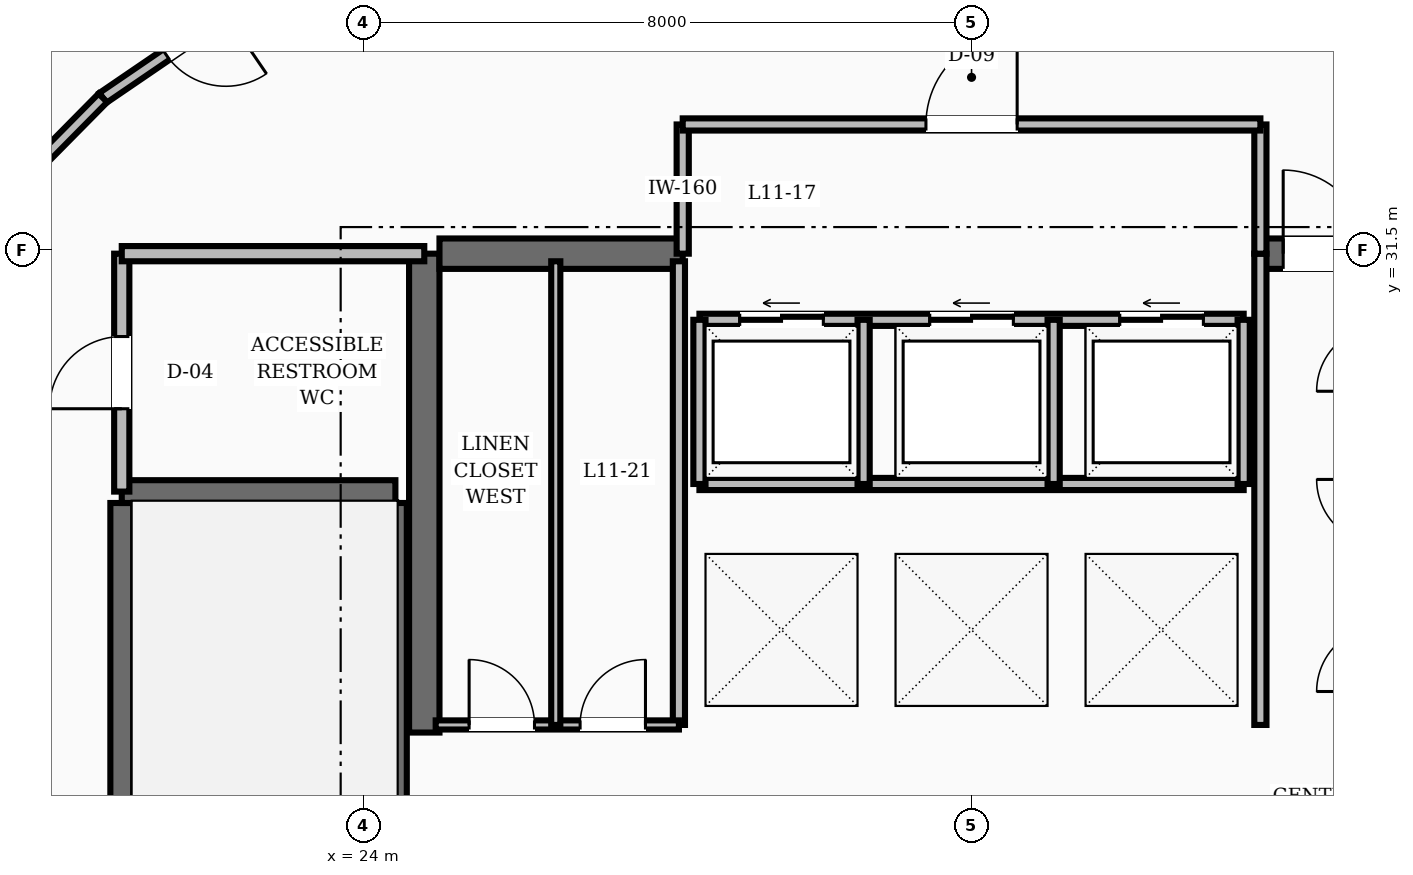
"""IFC4 building model, lengths in metres.
Left out: names, types, materials, properties, quantities, classifications, styles, units other than length and angle.
Written with IfcOpenShell. Run it as: python <this file> out.ifc"""

import sys

from ifc_helpers import new_model, si_unit, direction, frame, frame_2d, origin, place, context, subcontext, project, spatial, rectangle, extrude, element, fill, save


model = new_model("IFC4")
c1 = context("Model", 3, precision=1e-05, world=origin(), true_north=direction((0.0, 1.0)))
c2 = subcontext(c1, "Body", "Model", "MODEL_VIEW")
j1 = project(units=[si_unit("LENGTHUNIT", "METRE"), si_unit("PLANEANGLEUNIT", "RADIAN")], contexts=[c1])
p1 = place(None, origin())
s1 = spatial("IfcSite", under=j1, at=p1, CompositionType="ELEMENT")
p2 = place(p1, origin())
s2 = spatial("IfcBuilding", under=s1, at=p2, CompositionType="ELEMENT")
p3 = place(p2, frame((0.0, 0.0, 48.4)))
s3 = spatial("IfcBuildingStorey", under=s2, at=p3, CompositionType="ELEMENT", Elevation=48.4)
p4 = place(p3, frame((24.8, 25.15, 0.0), z_axis=(0.0, 0.0, 1.0), x_axis=(0.0, 1.0, 0.0)))
e1 = element("IfcWall", 1, at=p4, inside=s3, PredefinedType="SHEAR", context=c2, shape_type="SweptSolid", body=[
    extrude(rectangle(XDim=6.3, YDim=0.4, at=frame_2d((3.15, 0.0))), origin(), (0.0, 0.0, 1.0), 3.6),
])
p5 = place(p3, frame((25.0, 31.45, 0.0), z_axis=(0.0, 0.0, 1.0), x_axis=(1.0, 0.0, 0.0)))
e2 = element("IfcWall", 2, at=p5, inside=s3, PredefinedType="SHEAR", context=c2, shape_type="SweptSolid", body=[
    extrude(rectangle(XDim=3.2, YDim=0.4, at=frame_2d((1.6, 0.0))), origin(), (0.0, 0.0, 1.0), 3.6),
])
p6 = place(p3, frame((35.8, 31.45, 0.0), z_axis=(0.0, 0.0, 1.0), x_axis=(1.0, 0.0, 0.0)))
e3 = element("IfcWall", 3, at=p6, inside=s3, PredefinedType="SHEAR", context=c2, shape_type="SweptSolid", body=[
    extrude(rectangle(XDim=3.2, YDim=0.4, at=frame_2d((1.6, 0.0))), origin(), (0.0, 0.0, 1.0), 3.6),
])
p7 = place(p6, frame((0.3, 0.0, 0.0)))
e4 = element("IfcOpeningElement", 4, at=p7, cuts=e3, PredefinedType="OPENING", context=c2, shape_type="SweptSolid", body=[
    extrude(rectangle(XDim=1.1, YDim=2.1, at=frame_2d((0.55, 1.05))), frame((0.0, 0.21, 0.0), z_axis=(0.0, -1.0, 0.0), x_axis=(1.0, 0.0, 0.0)), (0.0, 0.0, 1.0), 0.42),
])
for number, where, z_axis, x_axis in (
    (5, (20.82, 19.43, 0.0), (0.0, 0.0, 1.0), (0.0, 1.0, 0.0)),
    (6, (24.42, 19.43, 0.0), (0.0, 0.0, 1.0), (0.0, 1.0, 0.0)),
):
    element("IfcWall", number, at=place(p3, frame(where, z_axis=z_axis, x_axis=x_axis)), inside=s3, PredefinedType="SHEAR", context=c2, shape_type="SweptSolid", body=[
        extrude(rectangle(XDim=8.74, YDim=0.3, at=frame_2d((4.37, 0.0))), origin(), (0.0, 0.0, 1.0), 3.6),
    ])
p8 = place(p3, frame((20.82, 28.32, 0.0), z_axis=(0.0, 0.0, 1.0), x_axis=(1.0, 0.0, 0.0)))
e7 = element("IfcWall", 7, at=p8, inside=s3, PredefinedType="SHEAR", context=c2, shape_type="SweptSolid", body=[
    extrude(rectangle(XDim=3.6, YDim=0.3, at=frame_2d((1.8, 0.0))), origin(), (0.0, 0.0, 1.0), 3.6),
])
p9 = place(p3, frame((20.82, 28.32, 0.0), z_axis=(0.0, 0.0, 1.0), x_axis=(0.0, 1.0, 0.0)))
e8 = element("IfcWall", 8, at=p9, inside=s3, PredefinedType="SOLIDWALL", context=c2, shape_type="SweptSolid", body=[
    extrude(rectangle(XDim=3.13, YDim=0.2, at=frame_2d((1.565, 0.0))), origin(), (0.0, 0.0, 1.0), 2.61),
])
p10 = place(p9, frame((1.09, 0.0, 0.0)))
e9 = element("IfcOpeningElement", 9, at=p10, cuts=e8, PredefinedType="OPENING", context=c2, shape_type="SweptSolid", body=[
    extrude(rectangle(XDim=0.95, YDim=2.1, at=frame_2d((0.475, 1.05))), frame((0.0, 0.11, 0.0), z_axis=(0.0, -1.0, 0.0), x_axis=(1.0, 0.0, 0.0)), (0.0, 0.0, 1.0), 0.22),
])
p11 = place(p3, frame((20.82, 31.45, 0.0), z_axis=(0.0, 0.0, 1.0), x_axis=(1.0, 0.0, 0.0)))
e10 = element("IfcWall", 10, at=p11, inside=s3, PredefinedType="SOLIDWALL", context=c2, shape_type="SweptSolid", body=[
    extrude(rectangle(XDim=3.98, YDim=0.2, at=frame_2d((1.99, 0.0))), origin(), (0.0, 0.0, 1.0), 2.61),
])
p12 = place(p3, frame((35.8, 25.25, 0.0), z_axis=(0.0, 0.0, 1.0), x_axis=(0.0, 1.0, 0.0)))
e11 = element("IfcWall", 11, at=p12, inside=s3, PredefinedType="SOLIDWALL", context=c2, shape_type="SweptSolid", body=[
    extrude(rectangle(XDim=6.2, YDim=0.16, at=frame_2d((3.1, 0.0))), origin(), (0.0, 0.0, 1.0), 2.61),
])
p13 = place(p3, frame((28.42, 30.58, 0.0), z_axis=(0.0, 0.0, 1.0), x_axis=(1.0, 0.0, 0.0)))
e12 = element("IfcWall", 12, at=p13, inside=s3, PredefinedType="SOLIDWALL", context=c2, shape_type="SweptSolid", body=[
    extrude(rectangle(XDim=7.16, YDim=0.16, at=frame_2d((3.58, 0.0))), origin(), (0.0, 0.0, 1.0), 2.61),
])
p14 = place(p13, frame((0.53, 0.0, 0.0)))
e13 = element("IfcOpeningElement", 13, at=p14, cuts=e12, PredefinedType="OPENING", context=c2, shape_type="SweptSolid", body=[
    extrude(rectangle(XDim=1.1, YDim=2.15, at=frame_2d((0.55, 1.075))), frame((0.0, 0.09, 0.0), z_axis=(0.0, -1.0, 0.0), x_axis=(1.0, 0.0, 0.0)), (0.0, 0.0, 1.0), 0.18),
])
p15 = place(p13, frame((3.03, 0.0, 0.0)))
e14 = element("IfcOpeningElement", 14, at=p15, cuts=e12, PredefinedType="OPENING", context=c2, shape_type="SweptSolid", body=[
    extrude(rectangle(XDim=1.1, YDim=2.15, at=frame_2d((0.55, 1.075))), frame((0.0, 0.09, 0.0), z_axis=(0.0, -1.0, 0.0), x_axis=(1.0, 0.0, 0.0)), (0.0, 0.0, 1.0), 0.18),
])
p16 = place(p13, frame((5.53, 0.0, 0.0)))
e15 = element("IfcOpeningElement", 15, at=p16, cuts=e12, PredefinedType="OPENING", context=c2, shape_type="SweptSolid", body=[
    extrude(rectangle(XDim=1.1, YDim=2.15, at=frame_2d((0.55, 1.075))), frame((0.0, 0.09, 0.0), z_axis=(0.0, -1.0, 0.0), x_axis=(1.0, 0.0, 0.0)), (0.0, 0.0, 1.0), 0.18),
])
p17 = place(p3, frame((28.42, 28.42, 0.0), z_axis=(0.0, 0.0, 1.0), x_axis=(1.0, 0.0, 0.0)))
e16 = element("IfcWall", 16, at=p17, inside=s3, PredefinedType="SOLIDWALL", context=c2, shape_type="SweptSolid", body=[
    extrude(rectangle(XDim=7.16, YDim=0.16, at=frame_2d((3.58, 0.0))), origin(), (0.0, 0.0, 1.0), 2.61),
])
for number, where, z_axis, x_axis in (
    (17, (28.42, 28.42, 0.0), (0.0, 0.0, 1.0), (0.0, 1.0, 0.0)),
    (18, (30.58, 28.42, 0.0), (0.0, 0.0, 1.0), (0.0, 1.0, 0.0)),
    (19, (33.08, 28.42, 0.0), (0.0, 0.0, 1.0), (0.0, 1.0, 0.0)),
    (20, (35.58, 28.42, 0.0), (0.0, 0.0, 1.0), (0.0, 1.0, 0.0)),
):
    element("IfcWall", number, at=place(p3, frame(where, z_axis=z_axis, x_axis=x_axis)), inside=s3, PredefinedType="SOLIDWALL", context=c2, shape_type="SweptSolid", body=[
        extrude(rectangle(XDim=2.16, YDim=0.16, at=frame_2d((1.08, 0.0))), origin(), (0.0, 0.0, 1.0), 2.61),
    ])
for number, where, z_axis, x_axis in (
    (21, (28.2, 31.45, 0.0), (0.0, 0.0, 1.0), (0.0, 1.0, 0.0)),
    (22, (35.8, 31.45, 0.0), (0.0, 0.0, 1.0), (0.0, 1.0, 0.0)),
):
    element("IfcWall", number, at=place(p3, frame(where, z_axis=z_axis, x_axis=x_axis)), inside=s3, PredefinedType="SOLIDWALL", context=c2, shape_type="SweptSolid", body=[
        extrude(rectangle(XDim=1.7, YDim=0.16, at=frame_2d((0.85, 0.0))), origin(), (0.0, 0.0, 1.0), 2.61),
    ])
p18 = place(p3, frame((28.2, 33.15, 0.0), z_axis=(0.0, 0.0, 1.0), x_axis=(1.0, 0.0, 0.0)))
e23 = element("IfcWall", 23, at=p18, inside=s3, PredefinedType="SOLIDWALL", context=c2, shape_type="SweptSolid", body=[
    extrude(rectangle(XDim=7.6, YDim=0.16, at=frame_2d((3.8, 0.0))), origin(), (0.0, 0.0, 1.0), 2.61),
])
p19 = place(p18, frame((3.2, 0.0, 0.0)))
e24 = element("IfcOpeningElement", 24, at=p19, cuts=e23, PredefinedType="OPENING", context=c2, shape_type="SweptSolid", body=[
    extrude(rectangle(XDim=1.2, YDim=2.1, at=frame_2d((0.6, 1.05))), frame((0.0, 0.09, 0.0), z_axis=(0.0, -1.0, 0.0), x_axis=(1.0, 0.0, 0.0)), (0.0, 0.0, 1.0), 0.18),
])
p20 = place(p3, frame((28.15, 25.25, 0.0), z_axis=(0.0, 0.0, 1.0), x_axis=(0.0, 1.0, 0.0)))
e25 = element("IfcWall", 25, at=p20, inside=s3, PredefinedType="SOLIDWALL", context=c2, shape_type="SweptSolid", body=[
    extrude(rectangle(XDim=6.1, YDim=0.16, at=frame_2d((3.05, 0.0))), origin(), (0.0, 0.0, 1.0), 2.61),
])
p21 = place(p3, frame((24.95, 25.25, 0.0), z_axis=(0.0, 0.0, 1.0), x_axis=(1.0, 0.0, 0.0)))
e26 = element("IfcWall", 26, at=p21, inside=s3, PredefinedType="PARTITIONING", context=c2, shape_type="SweptSolid", body=[
    extrude(rectangle(XDim=3.2, YDim=0.12, at=frame_2d((1.6, 0.0))), origin(), (0.0, 0.0, 1.0), 2.61),
])
p22 = place(p21, frame((0.44, 0.0, 0.0)))
e27 = element("IfcOpeningElement", 27, at=p22, cuts=e26, PredefinedType="OPENING", context=c2, shape_type="SweptSolid", body=[
    extrude(rectangle(XDim=0.86, YDim=2.1, at=frame_2d((0.43, 1.05))), frame((0.0, 0.07, 0.0), z_axis=(0.0, -1.0, 0.0), x_axis=(1.0, 0.0, 0.0)), (0.0, 0.0, 1.0), 0.14),
])
p23 = place(p21, frame((1.9, 0.0, 0.0)))
e28 = element("IfcOpeningElement", 28, at=p23, cuts=e26, PredefinedType="OPENING", context=c2, shape_type="SweptSolid", body=[
    extrude(rectangle(XDim=0.86, YDim=2.1, at=frame_2d((0.43, 1.05))), frame((0.0, 0.07, 0.0), z_axis=(0.0, -1.0, 0.0), x_axis=(1.0, 0.0, 0.0)), (0.0, 0.0, 1.0), 0.14),
])
p24 = place(p3, frame((26.53, 25.25, 0.0), z_axis=(0.0, 0.0, 1.0), x_axis=(0.0, 1.0, 0.0)))
e29 = element("IfcWall", 29, at=p24, inside=s3, PredefinedType="PARTITIONING", context=c2, shape_type="SweptSolid", body=[
    extrude(rectangle(XDim=6.1, YDim=0.12, at=frame_2d((3.05, 0.0))), origin(), (0.0, 0.0, 1.0), 2.61),
])
p25 = place(p3, frame((23.021, 35.17, 0.0), z_axis=(0.0, 0.0, 1.0), x_axis=(-0.826112340767, -0.563505457323, 0.0)))
e30 = element("IfcWall", 30, at=p25, inside=s3, PredefinedType="SOLIDWALL", context=c2, shape_type="SweptSolid", body=[
    extrude(rectangle(XDim=2.965, YDim=0.16, at=frame_2d((1.482, 0.0))), origin(), (0.0, 0.0, 1.0), 2.61),
])
p26 = place(p25, frame((1.007, 0.0, 0.0)))
e31 = element("IfcOpeningElement", 31, at=p26, cuts=e30, PredefinedType="OPENING", context=c2, shape_type="SweptSolid", body=[
    extrude(rectangle(XDim=0.95, YDim=2.1, at=frame_2d((0.475, 1.05))), frame((0.0, 0.09, 0.0), z_axis=(0.0, -1.0, 0.0), x_axis=(1.0, 0.0, 0.0)), (0.0, 0.0, 1.0), 0.18),
])
p27 = place(p3, frame((20.572, 33.499, 0.0), z_axis=(0.0, 0.0, 1.0), x_axis=(-0.702569520063, -0.711615113301, 0.0)))
e32 = element("IfcWall", 32, at=p27, inside=s3, PredefinedType="SOLIDWALL", context=c2, shape_type="SweptSolid", body=[
    extrude(rectangle(XDim=2.861, YDim=0.16, at=frame_2d((1.43, 0.0))), origin(), (0.0, 0.0, 1.0), 2.61),
])
p28 = place(p10, origin())
e33 = element("IfcDoor", 33, at=p28, inside=s3, OperationType="SINGLE_SWING_LEFT", PredefinedType="DOOR", context=c2, shape_type="SweptSolid", body=[
    extrude(rectangle(XDim=0.95, YDim=2.1, at=frame_2d((0.475, 1.05))), frame((0.0, 0.025, 0.0), z_axis=(0.0, -1.0, 0.0), x_axis=(1.0, 0.0, 0.0)), (0.0, 0.0, 1.0), 0.05),
])
fill(e9, e33)
p29 = place(p7, origin())
e34 = element("IfcDoor", 34, at=p29, inside=s3, OperationType="SINGLE_SWING_LEFT", PredefinedType="DOOR", context=c2, shape_type="SweptSolid", body=[
    extrude(rectangle(XDim=1.1, YDim=2.1, at=frame_2d((0.55, 1.05))), frame((0.0, 0.025, 0.0), z_axis=(0.0, -1.0, 0.0), x_axis=(1.0, 0.0, 0.0)), (0.0, 0.0, 1.0), 0.05),
])
fill(e4, e34)
p30 = place(p14, origin())
e35 = element("IfcDoor", 35, at=p30, inside=s3, OperationType="SLIDING_TO_LEFT", PredefinedType="DOOR", context=c2, shape_type="SweptSolid", body=[
    extrude(rectangle(XDim=1.1, YDim=2.15, at=frame_2d((0.55, 1.075))), frame((0.0, 0.025, 0.0), z_axis=(0.0, -1.0, 0.0), x_axis=(1.0, 0.0, 0.0)), (0.0, 0.0, 1.0), 0.05),
])
fill(e13, e35)
p31 = place(p15, origin())
e36 = element("IfcDoor", 36, at=p31, inside=s3, OperationType="SLIDING_TO_LEFT", PredefinedType="DOOR", context=c2, shape_type="SweptSolid", body=[
    extrude(rectangle(XDim=1.1, YDim=2.15, at=frame_2d((0.55, 1.075))), frame((0.0, 0.025, 0.0), z_axis=(0.0, -1.0, 0.0), x_axis=(1.0, 0.0, 0.0)), (0.0, 0.0, 1.0), 0.05),
])
fill(e14, e36)
p32 = place(p16, origin())
e37 = element("IfcDoor", 37, at=p32, inside=s3, OperationType="SLIDING_TO_LEFT", PredefinedType="DOOR", context=c2, shape_type="SweptSolid", body=[
    extrude(rectangle(XDim=1.1, YDim=2.15, at=frame_2d((0.55, 1.075))), frame((0.0, 0.025, 0.0), z_axis=(0.0, -1.0, 0.0), x_axis=(1.0, 0.0, 0.0)), (0.0, 0.0, 1.0), 0.05),
])
fill(e15, e37)
p33 = place(p19, origin())
e38 = element("IfcDoor", 38, at=p33, inside=s3, OperationType="SINGLE_SWING_RIGHT", PredefinedType="DOOR", context=c2, shape_type="SweptSolid", body=[
    extrude(rectangle(XDim=1.2, YDim=2.1, at=frame_2d((0.6, 1.05))), frame((0.0, 0.025, 0.0), z_axis=(0.0, -1.0, 0.0), x_axis=(1.0, 0.0, 0.0)), (0.0, 0.0, 1.0), 0.05),
])
fill(e24, e38)
p34 = place(p22, origin())
e39 = element("IfcDoor", 39, at=p34, inside=s3, OperationType="SINGLE_SWING_LEFT", PredefinedType="DOOR", context=c2, shape_type="SweptSolid", body=[
    extrude(rectangle(XDim=0.86, YDim=2.1, at=frame_2d((0.43, 1.05))), frame((0.0, 0.025, 0.0), z_axis=(0.0, -1.0, 0.0), x_axis=(1.0, 0.0, 0.0)), (0.0, 0.0, 1.0), 0.05),
])
fill(e27, e39)
p35 = place(p23, origin())
e40 = element("IfcDoor", 40, at=p35, inside=s3, OperationType="SINGLE_SWING_RIGHT", PredefinedType="DOOR", context=c2, shape_type="SweptSolid", body=[
    extrude(rectangle(XDim=0.86, YDim=2.1, at=frame_2d((0.43, 1.05))), frame((0.0, 0.025, 0.0), z_axis=(0.0, -1.0, 0.0), x_axis=(1.0, 0.0, 0.0)), (0.0, 0.0, 1.0), 0.05),
])
fill(e28, e40)
p36 = place(p26, origin())
e41 = element("IfcDoor", 41, at=p36, inside=s3, OperationType="SINGLE_SWING_LEFT", PredefinedType="DOOR", context=c2, shape_type="SweptSolid", body=[
    extrude(rectangle(XDim=0.95, YDim=2.1, at=frame_2d((0.475, 1.05))), frame((0.0, 0.025, 0.0), z_axis=(0.0, -1.0, 0.0), x_axis=(1.0, 0.0, 0.0)), (0.0, 0.0, 1.0), 0.05),
])
fill(e31, e41)
save(model, sys.argv[1])
